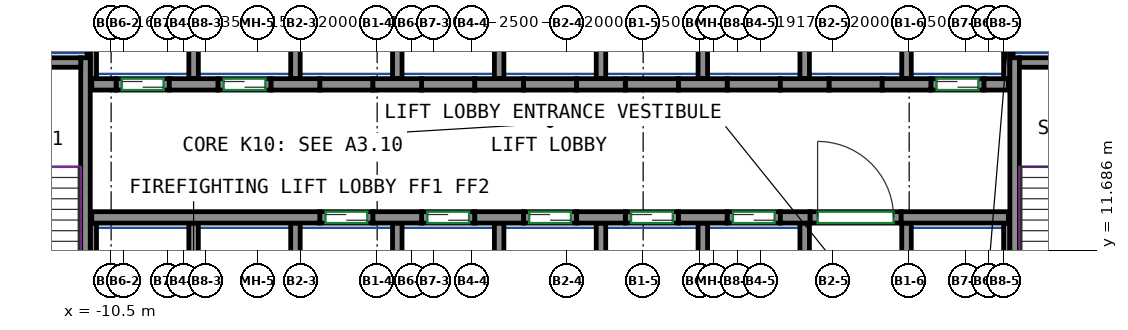
"""IFC4 building model, lengths in metres.
Left out: names, types, materials, properties, quantities, classifications, styles, units other than length and angle.
Written with IfcOpenShell. Run it as: python <this file> out.ifc"""

import sys

from ifc_helpers import new_model, si_unit, direction, frame, frame_2d, origin, place, context, subcontext, project, spatial, rectangle, extrude, source, transform, mapped, element, fill, save


model = new_model("IFC4")
c1 = context("Model", 3, precision=1e-05, world=origin(), true_north=direction((0.0, 1.0)))
c2 = subcontext(c1, "Body", "Model", "MODEL_VIEW")
j1 = project(units=[si_unit("LENGTHUNIT", "METRE"), si_unit("PLANEANGLEUNIT", "RADIAN")], contexts=[c1])
p1 = place(None, origin())
s1 = spatial("IfcSite", under=j1, at=p1, CompositionType="ELEMENT")
p2 = place(p1, origin())
s2 = spatial("IfcBuilding", under=s1, at=p2, CompositionType="ELEMENT")
p3 = place(p2, frame((0.0, 0.0, 43.0)))
s3 = spatial("IfcBuildingStorey", under=s2, at=p3, CompositionType="ELEMENT", Elevation=43.0)
m1 = source(origin(), c2, "Body", "SweptSolid", [
    extrude(rectangle(XDim=7.75, YDim=0.25, at=frame_2d((3.875, 0.0))), origin(), (0.0, 0.0, 1.0), 3.72),
])
p4 = place(p3, frame((-11.175, 9.0, 0.0), z_axis=(0.0, 0.0, 1.0), x_axis=(0.0, 1.0, 0.0)))
e1 = element("IfcWall", 1, at=p4, inside=s3, PredefinedType="SHEAR", context=c2, shape_type="MappedRepresentation", body=[
    mapped(m1, transform((0.0, 0.0, 0.0))),
])
m2 = source(origin(), c2, "Body", "SweptSolid", [
    extrude(rectangle(XDim=3.7, YDim=0.25, at=frame_2d((1.85, 0.0))), origin(), (0.0, 0.0, 1.0), 3.72),
])
p5 = place(p3, frame((-15.0, 16.625, 0.0), z_axis=(0.0, 0.0, 1.0), x_axis=(1.0, 0.0, 0.0)))
e2 = element("IfcWall", 2, at=p5, inside=s3, PredefinedType="SHEAR", context=c2, shape_type="MappedRepresentation", body=[
    mapped(m2, transform((0.0, 0.0, 0.0))),
])
p6 = place(p3, frame((13.275, 9.0, 0.0), z_axis=(0.0, 0.0, 1.0), x_axis=(0.0, 1.0, 0.0)))
e3 = element("IfcWall", 3, at=p6, inside=s3, PredefinedType="SHEAR", context=c2, shape_type="MappedRepresentation", body=[
    mapped(m1, transform((0.0, 0.0, 0.0))),
])
m3 = source(origin(), c2, "Body", "SweptSolid", [
    extrude(rectangle(XDim=3.7, YDim=0.25, at=frame_2d((1.85, 0.0))), origin(), (0.0, 0.0, 1.0), 3.72),
])
p7 = place(p3, frame((13.4, 16.625, 0.0), z_axis=(0.0, 0.0, 1.0), x_axis=(1.0, 0.0, 0.0)))
e4 = element("IfcWall", 4, at=p7, inside=s3, PredefinedType="SHEAR", context=c2, shape_type="MappedRepresentation", body=[
    mapped(m3, transform((0.0, 0.0, 0.0))),
])
m4 = source(origin(), c2, "Body", "SweptSolid", [
    extrude(rectangle(XDim=6.0, YDim=0.3, at=frame_2d((3.0, 0.0))), origin(), (0.0, 0.0, 1.0), 3.72),
])
p8 = place(p3, frame((-11.01, 12.55, 0.0), z_axis=(0.0, 0.0, 1.0), x_axis=(1.0, 0.0, 0.0)))
e5 = element("IfcWall", 5, at=p8, inside=s3, PredefinedType="SHEAR", context=c2, shape_type="MappedRepresentation", body=[
    mapped(m4, transform((0.0, 0.0, 0.0))),
])
m5 = source(origin(), c2, "Body", "SweptSolid", [
    extrude(rectangle(XDim=1.28, YDim=0.3, at=frame_2d((0.64, 0.0))), origin(), (0.0, 0.0, 1.0), 3.72),
])
for number, where, z_axis, x_axis in (
    (6, (-3.61, 12.55, 0.0), (0.0, 0.0, 1.0), (1.0, 0.0, 0.0)),
    (7, (-0.93, 12.55, 0.0), (0.0, 0.0, 1.0), (1.0, 0.0, 0.0)),
    (8, (1.75, 12.55, 0.0), (0.0, 0.0, 1.0), (1.0, 0.0, 0.0)),
    (9, (4.43, 12.55, 0.0), (0.0, 0.0, 1.0), (1.0, 0.0, 0.0)),
):
    element("IfcWall", number, at=place(p3, frame(where, z_axis=z_axis, x_axis=x_axis)), inside=s3, PredefinedType="SHEAR", context=c2, shape_type="MappedRepresentation", body=[
        mapped(m5, transform((0.0, 0.0, 0.0))),
    ])
m6 = source(origin(), c2, "Body", "SweptSolid", [
    extrude(rectangle(XDim=0.78, YDim=0.3, at=frame_2d((0.39, 0.0))), origin(), (0.0, 0.0, 1.0), 3.72),
])
p9 = place(p3, frame((7.11, 12.55, 0.0), z_axis=(0.0, 0.0, 1.0), x_axis=(1.0, 0.0, 0.0)))
e10 = element("IfcWall", 10, at=p9, inside=s3, PredefinedType="SHEAR", context=c2, shape_type="MappedRepresentation", body=[
    mapped(m6, transform((0.0, 0.0, 0.0))),
])
m7 = source(origin(), c2, "Body", "SweptSolid", [
    extrude(rectangle(XDim=2.82, YDim=0.3, at=frame_2d((1.41, 0.0))), origin(), (0.0, 0.0, 1.0), 3.72),
])
p10 = place(p3, frame((10.29, 12.55, 0.0), z_axis=(0.0, 0.0, 1.0), x_axis=(1.0, 0.0, 0.0)))
e11 = element("IfcWall", 11, at=p10, inside=s3, PredefinedType="SHEAR", context=c2, shape_type="MappedRepresentation", body=[
    mapped(m7, transform((0.0, 0.0, 0.0))),
])
m8 = source(origin(), c2, "Body", "SweptSolid", [
    extrude(rectangle(XDim=0.64, YDim=0.3, at=frame_2d((0.32, 0.0))), origin(), (0.0, 0.0, 1.0), 3.72),
])
p11 = place(p3, frame((-11.01, 16.05, 0.0), z_axis=(0.0, 0.0, 1.0), x_axis=(1.0, 0.0, 0.0)))
e12 = element("IfcWall", 12, at=p11, inside=s3, PredefinedType="SHEAR", context=c2, shape_type="MappedRepresentation", body=[
    mapped(m8, transform((0.0, 0.0, 0.0))),
])
for number, where, z_axis, x_axis in (
    (13, (-8.97, 16.05, 0.0), (0.0, 0.0, 1.0), (1.0, 0.0, 0.0)),
    (14, (-6.29, 16.05, 0.0), (0.0, 0.0, 1.0), (1.0, 0.0, 0.0)),
    (15, (-3.61, 16.05, 0.0), (0.0, 0.0, 1.0), (1.0, 0.0, 0.0)),
    (16, (-0.93, 16.05, 0.0), (0.0, 0.0, 1.0), (1.0, 0.0, 0.0)),
    (17, (1.75, 16.05, 0.0), (0.0, 0.0, 1.0), (1.0, 0.0, 0.0)),
    (18, (4.43, 16.05, 0.0), (0.0, 0.0, 1.0), (1.0, 0.0, 0.0)),
):
    element("IfcWall", number, at=place(p3, frame(where, z_axis=z_axis, x_axis=x_axis)), inside=s3, PredefinedType="SHEAR", context=c2, shape_type="MappedRepresentation", body=[
        mapped(m5, transform((0.0, 0.0, 0.0))),
    ])
m9 = source(origin(), c2, "Body", "SweptSolid", [
    extrude(rectangle(XDim=1.28, YDim=0.3, at=frame_2d((0.64, 0.0))), origin(), (0.0, 0.0, 1.0), 3.72),
])
p12 = place(p3, frame((7.11, 16.05, 0.0), z_axis=(0.0, 0.0, 1.0), x_axis=(1.0, 0.0, 0.0)))
e19 = element("IfcWall", 19, at=p12, inside=s3, PredefinedType="SHEAR", context=c2, shape_type="MappedRepresentation", body=[
    mapped(m9, transform((0.0, 0.0, 0.0))),
])
p13 = place(p3, frame((9.79, 16.05, 0.0), z_axis=(0.0, 0.0, 1.0), x_axis=(1.0, 0.0, 0.0)))
e20 = element("IfcWall", 20, at=p13, inside=s3, PredefinedType="SHEAR", context=c2, shape_type="MappedRepresentation", body=[
    mapped(m5, transform((0.0, 0.0, 0.0))),
])
m10 = source(origin(), c2, "Body", "SweptSolid", [
    extrude(rectangle(XDim=0.64, YDim=0.3, at=frame_2d((0.32, 0.0))), origin(), (0.0, 0.0, 1.0), 3.72),
])
p14 = place(p3, frame((12.47, 16.05, 0.0), z_axis=(0.0, 0.0, 1.0), x_axis=(1.0, 0.0, 0.0)))
e21 = element("IfcWall", 21, at=p14, inside=s3, PredefinedType="SHEAR", context=c2, shape_type="MappedRepresentation", body=[
    mapped(m10, transform((0.0, 0.0, 0.0))),
])
m11 = source(origin(), c2, "Body", "SweptSolid", [
    extrude(rectangle(XDim=1.4, YDim=0.3, at=frame_2d((0.7, 0.0))), origin(), (0.0, 0.0, 1.0), 3.72),
])
p15 = place(p3, frame((-5.01, 12.55, 0.0), z_axis=(0.0, 0.0, 1.0), x_axis=(1.0, 0.0, 0.0)))
e22 = element("IfcWall", 22, at=p15, inside=s3, PredefinedType="PARTITIONING", context=c2, shape_type="MappedRepresentation", body=[
    mapped(m11, transform((0.0, 0.0, 0.0))),
])
p16 = place(p15, frame((0.15, 0.0, 0.0)))
e23 = element("IfcOpeningElement", 23, at=p16, cuts=e22, PredefinedType="OPENING", context=c2, shape_type="SweptSolid", body=[
    extrude(rectangle(XDim=1.1, YDim=2.1, at=frame_2d((0.55, 1.05))), frame((0.0, 0.16, 0.0), z_axis=(0.0, -1.0, 0.0), x_axis=(1.0, 0.0, 0.0)), (0.0, 0.0, 1.0), 0.32),
])
m12 = source(origin(), c2, "Body", "SweptSolid", [
    extrude(rectangle(XDim=1.4, YDim=0.3, at=frame_2d((0.7, 0.0))), origin(), (0.0, 0.0, 1.0), 3.72),
])
p17 = place(p3, frame((-2.33, 12.55, 0.0), z_axis=(0.0, 0.0, 1.0), x_axis=(1.0, 0.0, 0.0)))
e24 = element("IfcWall", 24, at=p17, inside=s3, PredefinedType="PARTITIONING", context=c2, shape_type="MappedRepresentation", body=[
    mapped(m12, transform((0.0, 0.0, 0.0))),
])
p18 = place(p17, frame((0.15, 0.0, 0.0)))
e25 = element("IfcOpeningElement", 25, at=p18, cuts=e24, PredefinedType="OPENING", context=c2, shape_type="SweptSolid", body=[
    extrude(rectangle(XDim=1.1, YDim=2.1, at=frame_2d((0.55, 1.05))), frame((0.0, 0.16, 0.0), z_axis=(0.0, -1.0, 0.0), x_axis=(1.0, 0.0, 0.0)), (0.0, 0.0, 1.0), 0.32),
])
p19 = place(p3, frame((0.35, 12.55, 0.0), z_axis=(0.0, 0.0, 1.0), x_axis=(1.0, 0.0, 0.0)))
e26 = element("IfcWall", 26, at=p19, inside=s3, PredefinedType="PARTITIONING", context=c2, shape_type="MappedRepresentation", body=[
    mapped(m11, transform((0.0, 0.0, 0.0))),
])
p20 = place(p19, frame((0.15, 0.0, 0.0)))
e27 = element("IfcOpeningElement", 27, at=p20, cuts=e26, PredefinedType="OPENING", context=c2, shape_type="SweptSolid", body=[
    extrude(rectangle(XDim=1.1, YDim=2.1, at=frame_2d((0.55, 1.05))), frame((0.0, 0.16, 0.0), z_axis=(0.0, -1.0, 0.0), x_axis=(1.0, 0.0, 0.0)), (0.0, 0.0, 1.0), 0.32),
])
p21 = place(p3, frame((3.03, 12.55, 0.0), z_axis=(0.0, 0.0, 1.0), x_axis=(1.0, 0.0, 0.0)))
e28 = element("IfcWall", 28, at=p21, inside=s3, PredefinedType="PARTITIONING", context=c2, shape_type="MappedRepresentation", body=[
    mapped(m11, transform((0.0, 0.0, 0.0))),
])
p22 = place(p21, frame((0.15, 0.0, 0.0)))
e29 = element("IfcOpeningElement", 29, at=p22, cuts=e28, PredefinedType="OPENING", context=c2, shape_type="SweptSolid", body=[
    extrude(rectangle(XDim=1.1, YDim=2.1, at=frame_2d((0.55, 1.05))), frame((0.0, 0.16, 0.0), z_axis=(0.0, -1.0, 0.0), x_axis=(1.0, 0.0, 0.0)), (0.0, 0.0, 1.0), 0.32),
])
p23 = place(p3, frame((5.71, 12.55, 0.0), z_axis=(0.0, 0.0, 1.0), x_axis=(1.0, 0.0, 0.0)))
e30 = element("IfcWall", 30, at=p23, inside=s3, PredefinedType="PARTITIONING", context=c2, shape_type="MappedRepresentation", body=[
    mapped(m12, transform((0.0, 0.0, 0.0))),
])
p24 = place(p23, frame((0.15, 0.0, 0.0)))
e31 = element("IfcOpeningElement", 31, at=p24, cuts=e30, PredefinedType="OPENING", context=c2, shape_type="SweptSolid", body=[
    extrude(rectangle(XDim=1.1, YDim=2.1, at=frame_2d((0.55, 1.05))), frame((0.0, 0.16, 0.0), z_axis=(0.0, -1.0, 0.0), x_axis=(1.0, 0.0, 0.0)), (0.0, 0.0, 1.0), 0.32),
])
p25 = place(p3, frame((11.07, 16.05, 0.0), z_axis=(0.0, 0.0, 1.0), x_axis=(1.0, 0.0, 0.0)))
e32 = element("IfcWall", 32, at=p25, inside=s3, PredefinedType="PARTITIONING", context=c2, shape_type="MappedRepresentation", body=[
    mapped(m11, transform((0.0, 0.0, 0.0))),
])
p26 = place(p25, frame((0.15, 0.0, 0.0)))
e33 = element("IfcOpeningElement", 33, at=p26, cuts=e32, PredefinedType="OPENING", context=c2, shape_type="SweptSolid", body=[
    extrude(rectangle(XDim=1.1, YDim=2.1, at=frame_2d((0.55, 1.05))), frame((0.0, 0.16, 0.0), z_axis=(0.0, -1.0, 0.0), x_axis=(1.0, 0.0, 0.0)), (0.0, 0.0, 1.0), 0.32),
])
p27 = place(p3, frame((-10.37, 16.05, 0.0), z_axis=(0.0, 0.0, 1.0), x_axis=(1.0, 0.0, 0.0)))
e34 = element("IfcWall", 34, at=p27, inside=s3, PredefinedType="PARTITIONING", context=c2, shape_type="MappedRepresentation", body=[
    mapped(m12, transform((0.0, 0.0, 0.0))),
])
p28 = place(p27, frame((0.15, 0.0, 0.0)))
e35 = element("IfcOpeningElement", 35, at=p28, cuts=e34, PredefinedType="OPENING", context=c2, shape_type="SweptSolid", body=[
    extrude(rectangle(XDim=1.1, YDim=2.1, at=frame_2d((0.55, 1.05))), frame((0.0, 0.16, 0.0), z_axis=(0.0, -1.0, 0.0), x_axis=(1.0, 0.0, 0.0)), (0.0, 0.0, 1.0), 0.32),
])
p29 = place(p3, frame((-7.69, 16.05, 0.0), z_axis=(0.0, 0.0, 1.0), x_axis=(1.0, 0.0, 0.0)))
e36 = element("IfcWall", 36, at=p29, inside=s3, PredefinedType="PARTITIONING", context=c2, shape_type="MappedRepresentation", body=[
    mapped(m11, transform((0.0, 0.0, 0.0))),
])
p30 = place(p29, frame((0.15, 0.0, 0.0)))
e37 = element("IfcOpeningElement", 37, at=p30, cuts=e36, PredefinedType="OPENING", context=c2, shape_type="SweptSolid", body=[
    extrude(rectangle(XDim=1.1, YDim=2.1, at=frame_2d((0.55, 1.05))), frame((0.0, 0.16, 0.0), z_axis=(0.0, -1.0, 0.0), x_axis=(1.0, 0.0, 0.0)), (0.0, 0.0, 1.0), 0.32),
])
m13 = source(origin(), c2, "Body", "SweptSolid", [
    extrude(rectangle(XDim=2.4, YDim=0.3, at=frame_2d((1.2, 0.0))), origin(), (0.0, 0.0, 1.0), 3.72),
])
p31 = place(p3, frame((7.89, 12.55, 0.0), z_axis=(0.0, 0.0, 1.0), x_axis=(1.0, 0.0, 0.0)))
e38 = element("IfcWall", 38, at=p31, inside=s3, PredefinedType="PARTITIONING", context=c2, shape_type="MappedRepresentation", body=[
    mapped(m13, transform((0.0, 0.0, 0.0))),
])
p32 = place(p31, frame((0.2, 0.0, 0.0)))
e39 = element("IfcOpeningElement", 39, at=p32, cuts=e38, PredefinedType="OPENING", context=c2, shape_type="SweptSolid", body=[
    extrude(rectangle(XDim=2.0, YDim=2.1, at=frame_2d((1.0, 1.05))), frame((0.0, 0.16, 0.0), z_axis=(0.0, -1.0, 0.0), x_axis=(1.0, 0.0, 0.0)), (0.0, 0.0, 1.0), 0.32),
])
p33 = place(p3, frame((-5.01, 16.05, 0.0), z_axis=(0.0, 0.0, 1.0), x_axis=(1.0, 0.0, 0.0)))
e40 = element("IfcWall", 40, at=p33, inside=s3, PredefinedType="PARTITIONING", context=c2, shape_type="MappedRepresentation", body=[
    mapped(m11, transform((0.0, 0.0, 0.0))),
])
p34 = place(p3, frame((-2.33, 16.05, 0.0), z_axis=(0.0, 0.0, 1.0), x_axis=(1.0, 0.0, 0.0)))
e41 = element("IfcWall", 41, at=p34, inside=s3, PredefinedType="PARTITIONING", context=c2, shape_type="MappedRepresentation", body=[
    mapped(m12, transform((0.0, 0.0, 0.0))),
])
for number, where, z_axis, x_axis in (
    (42, (0.35, 16.05, 0.0), (0.0, 0.0, 1.0), (1.0, 0.0, 0.0)),
    (43, (3.03, 16.05, 0.0), (0.0, 0.0, 1.0), (1.0, 0.0, 0.0)),
):
    element("IfcWall", number, at=place(p3, frame(where, z_axis=z_axis, x_axis=x_axis)), inside=s3, PredefinedType="PARTITIONING", context=c2, shape_type="MappedRepresentation", body=[
        mapped(m11, transform((0.0, 0.0, 0.0))),
    ])
for number, where, z_axis, x_axis in (
    (44, (5.71, 16.05, 0.0), (0.0, 0.0, 1.0), (1.0, 0.0, 0.0)),
    (45, (8.39, 16.05, 0.0), (0.0, 0.0, 1.0), (1.0, 0.0, 0.0)),
):
    element("IfcWall", number, at=place(p3, frame(where, z_axis=z_axis, x_axis=x_axis)), inside=s3, PredefinedType="PARTITIONING", context=c2, shape_type="MappedRepresentation", body=[
        mapped(m12, transform((0.0, 0.0, 0.0))),
    ])
m14 = source(origin(), c2, "Body", "SweptSolid", [
    extrude(rectangle(XDim=3.275, YDim=0.165, at=frame_2d((1.638, 0.0))), origin(), (0.0, 0.0, 1.0), 3.72),
])
for number, where, z_axis, x_axis in (
    (46, (13.067, 16.2, 0.0), (0.0, 0.0, 1.0), (0.0, 1.0, 0.0)),
    (47, (-10.968, 16.2, 0.0), (0.0, 0.0, 1.0), (0.0, 1.0, 0.0)),
):
    element("IfcWall", number, at=place(p3, frame(where, z_axis=z_axis, x_axis=x_axis)), inside=s3, PredefinedType="PARTITIONING", context=c2, shape_type="MappedRepresentation", body=[
        mapped(m14, transform((0.0, 0.0, 0.0))),
    ])
m15 = source(origin(), c2, "Body", "SweptSolid", [
    extrude(rectangle(XDim=3.275, YDim=0.25, at=frame_2d((1.638, 0.0))), origin(), (0.0, 0.0, 1.0), 3.72),
])
p35 = place(p3, frame((10.43, 16.2, 0.0), z_axis=(0.0, 0.0, 1.0), x_axis=(0.0, 1.0, 0.0)))
e48 = element("IfcWall", 48, at=p35, inside=s3, PredefinedType="PARTITIONING", context=c2, shape_type="MappedRepresentation", body=[
    mapped(m15, transform((0.0, 0.0, 0.0))),
])
m16 = source(origin(), c2, "Body", "SweptSolid", [
    extrude(rectangle(XDim=2.725, YDim=0.085, at=frame_2d((1.363, 0.0))), origin(), (0.0, 0.0, 1.0), 3.72),
])
p36 = place(p3, frame((13.192, 16.75, 0.0), z_axis=(0.0, 0.0, 1.0), x_axis=(0.0, 1.0, 0.0)))
e49 = element("IfcWall", 49, at=p36, inside=s3, PredefinedType="PARTITIONING", context=c2, shape_type="MappedRepresentation", body=[
    mapped(m16, transform((0.0, 0.0, 0.0))),
])
for number, where, z_axis, x_axis in (
    (50, (2.39, 16.2, 0.0), (0.0, 0.0, 1.0), (0.0, 1.0, 0.0)),
    (51, (5.07, 16.2, 0.0), (0.0, 0.0, 1.0), (0.0, 1.0, 0.0)),
    (52, (7.75, 16.2, 0.0), (0.0, 0.0, 1.0), (0.0, 1.0, 0.0)),
    (53, (-0.29, 16.2, 0.0), (0.0, 0.0, 1.0), (0.0, 1.0, 0.0)),
):
    element("IfcWall", number, at=place(p3, frame(where, z_axis=z_axis, x_axis=x_axis)), inside=s3, PredefinedType="PARTITIONING", context=c2, shape_type="MappedRepresentation", body=[
        mapped(m15, transform((0.0, 0.0, 0.0))),
    ])
p37 = place(p3, frame((-11.093, 16.75, 0.0), z_axis=(0.0, 0.0, 1.0), x_axis=(0.0, 1.0, 0.0)))
e54 = element("IfcWall", 54, at=p37, inside=s3, PredefinedType="PARTITIONING", context=c2, shape_type="MappedRepresentation", body=[
    mapped(m16, transform((0.0, 0.0, 0.0))),
])
for number, where, z_axis, x_axis in (
    (55, (-2.97, 16.2, 0.0), (0.0, 0.0, 1.0), (0.0, 1.0, 0.0)),
    (56, (-5.65, 16.2, 0.0), (0.0, 0.0, 1.0), (0.0, 1.0, 0.0)),
    (57, (-8.33, 16.2, 0.0), (0.0, 0.0, 1.0), (0.0, 1.0, 0.0)),
):
    element("IfcWall", number, at=place(p3, frame(where, z_axis=z_axis, x_axis=x_axis)), inside=s3, PredefinedType="PARTITIONING", context=c2, shape_type="MappedRepresentation", body=[
        mapped(m15, transform((0.0, 0.0, 0.0))),
    ])
m17 = source(origin(), c2, "Body", "SweptSolid", [
    extrude(rectangle(XDim=3.4, YDim=0.25, at=frame_2d((1.7, 0.0))), origin(), (0.0, 0.0, 1.0), 3.72),
])
p38 = place(p3, frame((10.43, 9.0, 0.0), z_axis=(0.0, 0.0, 1.0), x_axis=(0.0, 1.0, 0.0)))
e58 = element("IfcWall", 58, at=p38, inside=s3, PredefinedType="PARTITIONING", context=c2, shape_type="MappedRepresentation", body=[
    mapped(m17, transform((0.0, 0.0, 0.0))),
])
m18 = source(origin(), c2, "Body", "SweptSolid", [
    extrude(rectangle(XDim=3.4, YDim=0.165, at=frame_2d((1.7, 0.0))), origin(), (0.0, 0.0, 1.0), 3.72),
])
p39 = place(p3, frame((13.067, 9.0, 0.0), z_axis=(0.0, 0.0, 1.0), x_axis=(0.0, 1.0, 0.0)))
e59 = element("IfcWall", 59, at=p39, inside=s3, PredefinedType="PARTITIONING", context=c2, shape_type="MappedRepresentation", body=[
    mapped(m18, transform((0.0, 0.0, 0.0))),
])
for number, where, z_axis, x_axis in (
    (60, (2.39, 9.0, 0.0), (0.0, 0.0, 1.0), (0.0, 1.0, 0.0)),
    (61, (5.07, 9.0, 0.0), (0.0, 0.0, 1.0), (0.0, 1.0, 0.0)),
    (62, (7.75, 9.0, 0.0), (0.0, 0.0, 1.0), (0.0, 1.0, 0.0)),
    (63, (-0.29, 9.0, 0.0), (0.0, 0.0, 1.0), (0.0, 1.0, 0.0)),
):
    element("IfcWall", number, at=place(p3, frame(where, z_axis=z_axis, x_axis=x_axis)), inside=s3, PredefinedType="PARTITIONING", context=c2, shape_type="MappedRepresentation", body=[
        mapped(m17, transform((0.0, 0.0, 0.0))),
    ])
p40 = place(p3, frame((-10.968, 9.0, 0.0), z_axis=(0.0, 0.0, 1.0), x_axis=(0.0, 1.0, 0.0)))
e64 = element("IfcWall", 64, at=p40, inside=s3, PredefinedType="PARTITIONING", context=c2, shape_type="MappedRepresentation", body=[
    mapped(m18, transform((0.0, 0.0, 0.0))),
])
for number, where, z_axis, x_axis in (
    (65, (-2.97, 9.0, 0.0), (0.0, 0.0, 1.0), (0.0, 1.0, 0.0)),
    (66, (-5.65, 9.0, 0.0), (0.0, 0.0, 1.0), (0.0, 1.0, 0.0)),
    (67, (-8.33, 9.0, 0.0), (0.0, 0.0, 1.0), (0.0, 1.0, 0.0)),
):
    element("IfcWall", number, at=place(p3, frame(where, z_axis=z_axis, x_axis=x_axis)), inside=s3, PredefinedType="PARTITIONING", context=c2, shape_type="MappedRepresentation", body=[
        mapped(m17, transform((0.0, 0.0, 0.0))),
    ])
p41 = place(p32, origin())
e68 = element("IfcDoor", 68, at=p41, inside=s3, OperationType="DOUBLE_DOOR_SINGLE_SWING", PredefinedType="DOOR", context=c2, shape_type="SweptSolid", body=[
    extrude(rectangle(XDim=2.0, YDim=2.1, at=frame_2d((1.0, 1.05))), frame((0.0, 0.025, 0.0), z_axis=(0.0, -1.0, 0.0), x_axis=(1.0, 0.0, 0.0)), (0.0, 0.0, 1.0), 0.05),
])
fill(e39, e68)
p42 = place(p16, origin())
e69 = element("IfcDoor", 69, at=p42, inside=s3, OperationType="DOUBLE_DOOR_SLIDING", PredefinedType="DOOR", context=c2, shape_type="SweptSolid", body=[
    extrude(rectangle(XDim=1.1, YDim=2.1, at=frame_2d((0.55, 1.05))), frame((0.0, 0.025, 0.0), z_axis=(0.0, -1.0, 0.0), x_axis=(1.0, 0.0, 0.0)), (0.0, 0.0, 1.0), 0.05),
])
fill(e23, e69)
p43 = place(p18, origin())
e70 = element("IfcDoor", 70, at=p43, inside=s3, OperationType="DOUBLE_DOOR_SLIDING", PredefinedType="DOOR", context=c2, shape_type="SweptSolid", body=[
    extrude(rectangle(XDim=1.1, YDim=2.1, at=frame_2d((0.55, 1.05))), frame((0.0, 0.025, 0.0), z_axis=(0.0, -1.0, 0.0), x_axis=(1.0, 0.0, 0.0)), (0.0, 0.0, 1.0), 0.05),
])
fill(e25, e70)
p44 = place(p20, origin())
e71 = element("IfcDoor", 71, at=p44, inside=s3, OperationType="DOUBLE_DOOR_SLIDING", PredefinedType="DOOR", context=c2, shape_type="SweptSolid", body=[
    extrude(rectangle(XDim=1.1, YDim=2.1, at=frame_2d((0.55, 1.05))), frame((0.0, 0.025, 0.0), z_axis=(0.0, -1.0, 0.0), x_axis=(1.0, 0.0, 0.0)), (0.0, 0.0, 1.0), 0.05),
])
fill(e27, e71)
p45 = place(p22, origin())
e72 = element("IfcDoor", 72, at=p45, inside=s3, OperationType="DOUBLE_DOOR_SLIDING", PredefinedType="DOOR", context=c2, shape_type="SweptSolid", body=[
    extrude(rectangle(XDim=1.1, YDim=2.1, at=frame_2d((0.55, 1.05))), frame((0.0, 0.025, 0.0), z_axis=(0.0, -1.0, 0.0), x_axis=(1.0, 0.0, 0.0)), (0.0, 0.0, 1.0), 0.05),
])
fill(e29, e72)
p46 = place(p24, origin())
e73 = element("IfcDoor", 73, at=p46, inside=s3, OperationType="DOUBLE_DOOR_SLIDING", PredefinedType="DOOR", context=c2, shape_type="SweptSolid", body=[
    extrude(rectangle(XDim=1.1, YDim=2.1, at=frame_2d((0.55, 1.05))), frame((0.0, 0.025, 0.0), z_axis=(0.0, -1.0, 0.0), x_axis=(1.0, 0.0, 0.0)), (0.0, 0.0, 1.0), 0.05),
])
fill(e31, e73)
p47 = place(p26, origin())
e74 = element("IfcDoor", 74, at=p47, inside=s3, OperationType="DOUBLE_DOOR_SLIDING", PredefinedType="DOOR", context=c2, shape_type="SweptSolid", body=[
    extrude(rectangle(XDim=1.1, YDim=2.1, at=frame_2d((0.55, 1.05))), frame((0.0, 0.025, 0.0), z_axis=(0.0, -1.0, 0.0), x_axis=(1.0, 0.0, 0.0)), (0.0, 0.0, 1.0), 0.05),
])
fill(e33, e74)
p48 = place(p28, origin())
e75 = element("IfcDoor", 75, at=p48, inside=s3, OperationType="DOUBLE_DOOR_SLIDING", PredefinedType="DOOR", context=c2, shape_type="SweptSolid", body=[
    extrude(rectangle(XDim=1.1, YDim=2.1, at=frame_2d((0.55, 1.05))), frame((0.0, 0.025, 0.0), z_axis=(0.0, -1.0, 0.0), x_axis=(1.0, 0.0, 0.0)), (0.0, 0.0, 1.0), 0.05),
])
fill(e35, e75)
p49 = place(p30, origin())
e76 = element("IfcDoor", 76, at=p49, inside=s3, OperationType="DOUBLE_DOOR_SLIDING", PredefinedType="DOOR", context=c2, shape_type="SweptSolid", body=[
    extrude(rectangle(XDim=1.1, YDim=2.1, at=frame_2d((0.55, 1.05))), frame((0.0, 0.025, 0.0), z_axis=(0.0, -1.0, 0.0), x_axis=(1.0, 0.0, 0.0)), (0.0, 0.0, 1.0), 0.05),
])
fill(e37, e76)
save(model, sys.argv[1])
